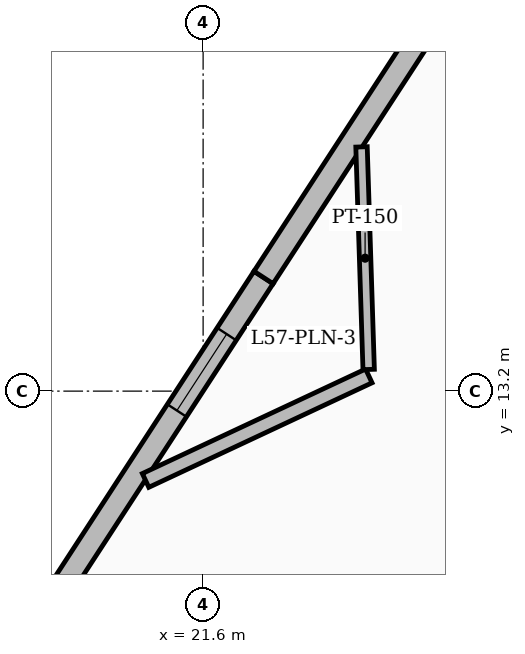
"""IFC4 building model, lengths in metres.
Left out: names, types, materials, properties, quantities, classifications, styles, units other than length and angle.
Written with IfcOpenShell. Run it as: python <this file> out.ifc"""

import sys

from ifc_helpers import new_model, si_unit, direction, frame, frame_2d, origin, place, context, subcontext, project, spatial, rectangle, extrude, element, fill, save


model = new_model("IFC4")
c1 = context("Model", 3, precision=1e-05, world=origin(), true_north=direction((0.0, 1.0)))
c2 = subcontext(c1, "Body", "Model", "MODEL_VIEW")
j1 = project(units=[si_unit("LENGTHUNIT", "METRE"), si_unit("PLANEANGLEUNIT", "RADIAN")], contexts=[c1])
p1 = place(None, origin())
s1 = spatial("IfcSite", under=j1, at=p1, CompositionType="ELEMENT")
p2 = place(p1, origin())
s2 = spatial("IfcBuilding", under=s1, at=p2, CompositionType="ELEMENT")
p3 = place(p2, frame((0.0, 0.0, 222.0)))
s3 = spatial("IfcBuildingStorey", under=s2, at=p3, CompositionType="ELEMENT", Elevation=222.0)
p4 = place(p3, frame((19.25, 9.865, 0.0), z_axis=(0.0, 0.0, 1.0), x_axis=(0.545595688913, 0.838048533343, 0.0)))
e1 = element("IfcWall", 1, at=p4, inside=s3, PredefinedType="SOLIDWALL", context=c2, shape_type="SweptSolid", body=[
    extrude(rectangle(XDim=5.763, YDim=0.3, at=frame_2d((2.882, 0.0))), origin(), (0.0, 0.0, 1.0), 3.5),
])
p5 = place(p4, frame((3.675, 0.0, 0.8)))
e2 = element("IfcOpeningElement", 2, at=p5, cuts=e1, PredefinedType="OPENING", context=c2, shape_type="SweptSolid", body=[
    extrude(rectangle(XDim=1.2, YDim=1.8, at=frame_2d((0.6, 0.9))), frame((0.0, 0.16, 0.0), z_axis=(0.0, -1.0, 0.0), x_axis=(1.0, 0.0, 0.0)), (0.0, 0.0, 1.0), 0.32),
])
p6 = place(p3, frame((22.395, 14.695, 0.0), z_axis=(0.0, 0.0, 1.0), x_axis=(0.545593263522, 0.838050112344, 0.0)))
e3 = element("IfcWall", 3, at=p6, inside=s3, PredefinedType="SOLIDWALL", context=c2, shape_type="SweptSolid", body=[
    extrude(rectangle(XDim=5.489, YDim=0.3, at=frame_2d((2.744, 0.0))), origin(), (0.0, 0.0, 1.0), 3.5),
])
p7 = place(p3, frame((23.78, 13.4, 0.0), z_axis=(0.0, 0.0, 1.0), x_axis=(-0.905663163948, -0.423997916821, 0.0)))
e4 = element("IfcWall", 4, at=p7, inside=s3, PredefinedType="PARTITIONING", context=c2, shape_type="SweptSolid", body=[
    extrude(rectangle(XDim=3.243, YDim=0.2, at=frame_2d((1.622, 0.0))), origin(), (0.0, 0.0, 1.0), 2.82),
])
p8 = place(p3, frame((23.684, 16.413, 0.0), z_axis=(0.0, 0.0, 1.0), x_axis=(0.032085531045, -0.999485126802, 0.0)))
e5 = element("IfcWall", 5, at=p8, inside=s3, PredefinedType="PARTITIONING", context=c2, shape_type="SweptSolid", body=[
    extrude(rectangle(XDim=2.929, YDim=0.15, at=frame_2d((1.465, 0.0))), origin(), (0.0, 0.0, 1.0), 2.82),
])
p9 = place(p5, origin())
e6 = element("IfcWindow", 6, at=p9, inside=s3, PartitioningType="SINGLE_PANEL", PredefinedType="WINDOW", context=c2, shape_type="SweptSolid", body=[
    extrude(rectangle(XDim=1.2, YDim=1.8, at=frame_2d((0.6, 0.9))), frame((0.0, 0.03, 0.0), z_axis=(0.0, -1.0, 0.0), x_axis=(1.0, 0.0, 0.0)), (0.0, 0.0, 1.0), 0.06),
])
fill(e2, e6)
save(model, sys.argv[1])
